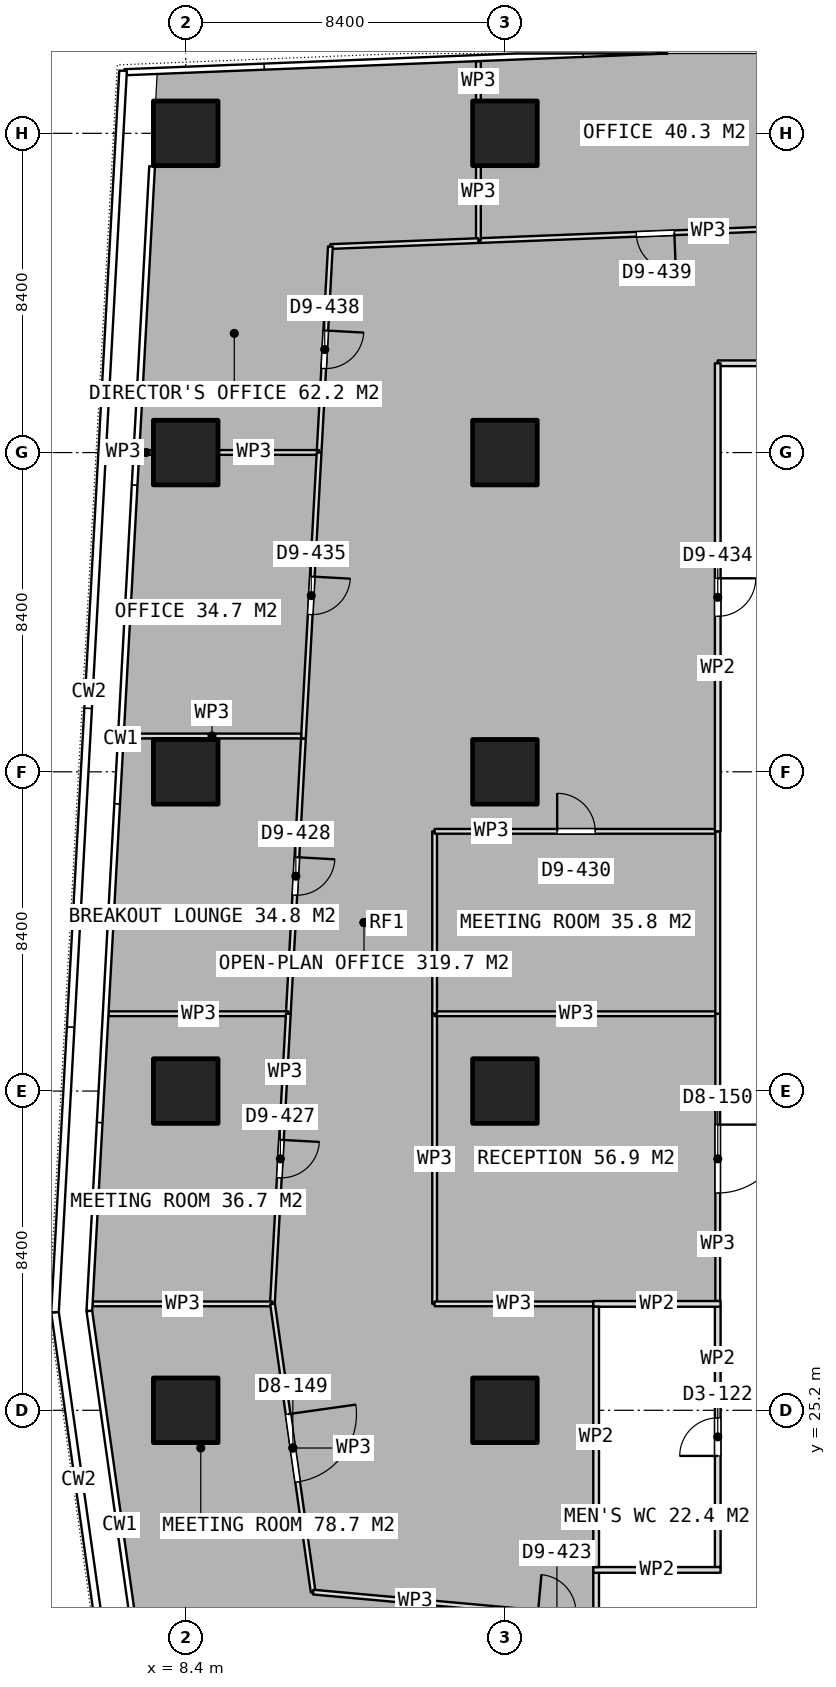
"""IFC4 building model, lengths in metres.
Left out: names, types, materials, properties, quantities, classifications, styles, units other than length and angle.
Written with IfcOpenShell. Run it as: python <this file> out.ifc"""

import sys

from ifc_helpers import new_model, si_unit, direction, frame, frame_2d, origin, origin_2d, place, context, subcontext, project, spatial, rectangle, extrude, element, fill, save


model = new_model("IFC4")
c1 = context("Model", 3, precision=1e-05, world=origin(), true_north=direction((0.0, 1.0)))
c2 = subcontext(c1, "Body", "Model", "MODEL_VIEW")
j1 = project(units=[si_unit("LENGTHUNIT", "METRE"), si_unit("PLANEANGLEUNIT", "RADIAN")], contexts=[c1])
p1 = place(None, origin())
s1 = spatial("IfcSite", under=j1, at=p1, CompositionType="ELEMENT")
p2 = place(p1, origin())
s2 = spatial("IfcBuilding", under=s1, at=p2, CompositionType="ELEMENT")
p3 = place(p2, frame((0.0, 0.0, 117.8)))
s3 = spatial("IfcBuildingStorey", under=s2, at=p3, CompositionType="ELEMENT", Elevation=117.8)
for number, where, z_axis, x_axis in (
    (1, (8.4, 25.2, 0.0), (0.0, 0.0, 1.0), (1.0, 0.0, 0.0)),
    (2, (8.4, 33.6, 0.0), (0.0, 0.0, 1.0), (1.0, 0.0, 0.0)),
    (3, (8.4, 42.0, 0.0), (0.0, 0.0, 1.0), (1.0, 0.0, 0.0)),
    (4, (8.4, 50.4, 0.0), (0.0, 0.0, 1.0), (1.0, 0.0, 0.0)),
    (5, (8.4, 58.8, 0.0), (0.0, 0.0, 1.0), (1.0, 0.0, 0.0)),
    (6, (16.8, 25.2, 0.0), (0.0, 0.0, 1.0), (1.0, 0.0, 0.0)),
    (7, (16.8, 33.6, 0.0), (0.0, 0.0, 1.0), (1.0, 0.0, 0.0)),
    (8, (16.8, 42.0, 0.0), (0.0, 0.0, 1.0), (1.0, 0.0, 0.0)),
    (9, (16.8, 50.4, 0.0), (0.0, 0.0, 1.0), (1.0, 0.0, 0.0)),
    (10, (16.8, 58.8, 0.0), (0.0, 0.0, 1.0), (1.0, 0.0, 0.0)),
):
    element("IfcColumn", number, at=place(p3, frame(where, z_axis=z_axis, x_axis=x_axis)), inside=s3, PredefinedType="COLUMN", context=c2, shape_type="SweptSolid", body=[
        extrude(rectangle(XDim=1.7, YDim=1.7, at=origin_2d()), origin(), (0.0, 0.0, 1.0), 3.75),
    ])
for number, where, z_axis, x_axis in (
    (11, (19.125, 21.0, 0.0), (0.0, 0.0, 1.0), (1.0, 0.0, 0.0)),
    (12, (19.125, 28.0, 0.0), (0.0, 0.0, 1.0), (1.0, 0.0, 0.0)),
):
    element("IfcWall", number, at=place(p3, frame(where, z_axis=z_axis, x_axis=x_axis)), inside=s3, PredefinedType="PARTITIONING", context=c2, shape_type="SweptSolid", body=[
        extrude(rectangle(XDim=3.35, YDim=0.15, at=frame_2d((1.675, 0.0))), origin(), (0.0, 0.0, 1.0), 3.5),
    ])
p4 = place(p3, frame((19.2, 21.075, 0.0), z_axis=(0.0, 0.0, 1.0), x_axis=(0.0, 1.0, 0.0)))
e13 = element("IfcWall", 13, at=p4, inside=s3, PredefinedType="PARTITIONING", context=c2, shape_type="SweptSolid", body=[
    extrude(rectangle(XDim=6.85, YDim=0.15, at=frame_2d((3.425, 0.0))), origin(), (0.0, 0.0, 1.0), 3.5),
])
p5 = place(p3, frame((22.4, 21.075, 0.0), z_axis=(0.0, 0.0, 1.0), x_axis=(0.0, 1.0, 0.0)))
e14 = element("IfcWall", 14, at=p5, inside=s3, PredefinedType="PARTITIONING", context=c2, shape_type="SweptSolid", body=[
    extrude(rectangle(XDim=6.85, YDim=0.15, at=frame_2d((3.425, 0.0))), origin(), (0.0, 0.0, 1.0), 3.5),
])
p6 = place(p5, frame((2.925, 0.0, 0.0)))
e15 = element("IfcOpeningElement", 15, at=p6, cuts=e14, PredefinedType="OPENING", context=c2, shape_type="SweptSolid", body=[
    extrude(rectangle(XDim=1.0, YDim=2.1, at=frame_2d((0.5, 1.05))), frame((0.0, 0.085, 0.0), z_axis=(0.0, -1.0, 0.0), x_axis=(1.0, 0.0, 0.0)), (0.0, 0.0, 1.0), 0.17),
])
p7 = place(p3, frame((25.413, 56.35, 0.0), z_axis=(0.0, 0.0, 1.0), x_axis=(-0.999198361773, -0.04003290935, 0.0)))
e16 = element("IfcWall", 16, at=p7, inside=s3, PredefinedType="PARTITIONING", context=c2, shape_type="SweptSolid", body=[
    extrude(rectangle(XDim=9.319, YDim=0.125, at=frame_2d((4.659, 0.0))), origin(), (0.0, 0.0, 1.0), 3.5),
])
p8 = place(p7, frame((4.159, 0.0, 0.0)))
e17 = element("IfcOpeningElement", 17, at=p8, cuts=e16, PredefinedType="OPENING", context=c2, shape_type="SweptSolid", body=[
    extrude(rectangle(XDim=1.0, YDim=2.1, at=frame_2d((0.5, 1.05))), frame((0.0, 0.073, 0.0), z_axis=(0.0, -1.0, 0.0), x_axis=(1.0, 0.0, 0.0)), (0.0, 0.0, 1.0), 0.145),
])
p9 = place(p3, frame((16.102, 55.977, 0.0), z_axis=(0.0, 0.0, 1.0), x_axis=(0.0, 1.0, 0.0)))
e18 = element("IfcWall", 18, at=p9, inside=s3, PredefinedType="PARTITIONING", context=c2, shape_type="SweptSolid", body=[
    extrude(rectangle(XDim=1.953, YDim=0.125, at=frame_2d((0.977, 0.0))), origin(), (0.0, 0.0, 1.0), 3.5),
])
p10 = place(p3, frame((16.102, 59.67, 0.0), z_axis=(0.0, 0.0, 1.0), x_axis=(0.0, 1.0, 0.0)))
e19 = element("IfcWall", 19, at=p10, inside=s3, PredefinedType="PARTITIONING", context=c2, shape_type="SweptSolid", body=[
    extrude(rectangle(XDim=1.03, YDim=0.125, at=frame_2d((0.515, 0.0))), origin(), (0.0, 0.0, 1.0), 3.5),
])
p11 = place(p3, frame((16.101, 55.977, 0.0), z_axis=(0.0, 0.0, 1.0), x_axis=(-0.99919845494, -0.040030583869, 0.0)))
e20 = element("IfcWall", 20, at=p11, inside=s3, PredefinedType="PARTITIONING", context=c2, shape_type="SweptSolid", body=[
    extrude(rectangle(XDim=3.897, YDim=0.125, at=frame_2d((1.949, 0.0))), origin(), (0.0, 0.0, 1.0), 3.5),
])
p12 = place(p3, frame((12.207, 55.821, 0.0), z_axis=(0.0, 0.0, 1.0), x_axis=(-0.054757305638, -0.998499693279, 0.0)))
e21 = element("IfcWall", 21, at=p12, inside=s3, PredefinedType="PARTITIONING", context=c2, shape_type="SweptSolid", body=[
    extrude(rectangle(XDim=5.426, YDim=0.125, at=frame_2d((2.713, 0.0))), origin(), (0.0, 0.0, 1.0), 3.5),
])
p13 = place(p12, frame((2.213, 0.0, 0.0)))
e22 = element("IfcOpeningElement", 22, at=p13, cuts=e21, PredefinedType="OPENING", context=c2, shape_type="SweptSolid", body=[
    extrude(rectangle(XDim=1.0, YDim=2.1, at=frame_2d((0.5, 1.05))), frame((0.0, 0.073, 0.0), z_axis=(0.0, -1.0, 0.0), x_axis=(1.0, 0.0, 0.0)), (0.0, 0.0, 1.0), 0.145),
])
p14 = place(p3, frame((11.91, 50.403, 0.0), z_axis=(0.0, 0.0, 1.0), x_axis=(-1.0, 0.0, 0.0)))
e23 = element("IfcWall", 23, at=p14, inside=s3, PredefinedType="PARTITIONING", context=c2, shape_type="SweptSolid", body=[
    extrude(rectangle(XDim=2.64, YDim=0.125, at=frame_2d((1.32, 0.0))), origin(), (0.0, 0.0, 1.0), 3.5),
])
p15 = place(p3, frame((7.53, 50.403, 0.0), z_axis=(0.0, 0.0, 1.0), x_axis=(-1.0, 0.0, 0.0)))
e24 = element("IfcWall", 24, at=p15, inside=s3, PredefinedType="PARTITIONING", context=c2, shape_type="SweptSolid", body=[
    extrude(rectangle(XDim=0.347, YDim=0.125, at=frame_2d((0.173, 0.0))), origin(), (0.0, 0.0, 1.0), 3.5),
])
p16 = place(p3, frame((11.91, 50.402, 0.0), z_axis=(0.0, 0.0, 1.0), x_axis=(-0.054750918435, -0.998500043531, 0.0)))
e25 = element("IfcWall", 25, at=p16, inside=s3, PredefinedType="PARTITIONING", context=c2, shape_type="SweptSolid", body=[
    extrude(rectangle(XDim=7.54, YDim=0.125, at=frame_2d((3.77, 0.0))), origin(), (0.0, 0.0, 1.0), 3.5),
])
p17 = place(p16, frame((3.27, 0.0, 0.0)))
e26 = element("IfcOpeningElement", 26, at=p17, cuts=e25, PredefinedType="OPENING", context=c2, shape_type="SweptSolid", body=[
    extrude(rectangle(XDim=1.0, YDim=2.1, at=frame_2d((0.5, 1.05))), frame((0.0, 0.073, 0.0), z_axis=(0.0, -1.0, 0.0), x_axis=(1.0, 0.0, 0.0)), (0.0, 0.0, 1.0), 0.145),
])
p18 = place(p3, frame((11.438, 42.943, 0.0), z_axis=(0.0, 0.0, 1.0), x_axis=(-1.0, 0.0, 0.0)))
e27 = element("IfcWall", 27, at=p18, inside=s3, PredefinedType="PARTITIONING", context=c2, shape_type="SweptSolid", body=[
    extrude(rectangle(XDim=4.694, YDim=0.125, at=frame_2d((2.347, 0.0))), origin(), (0.0, 0.0, 1.0), 3.5),
])
p19 = place(p3, frame((11.497, 42.872, 0.0), z_axis=(0.0, 0.0, 1.0), x_axis=(-0.054770412321, -0.998498974428, 0.0)))
e28 = element("IfcWall", 28, at=p19, inside=s3, PredefinedType="PARTITIONING", context=c2, shape_type="SweptSolid", body=[
    extrude(rectangle(XDim=7.248, YDim=0.125, at=frame_2d((3.624, 0.0))), origin(), (0.0, 0.0, 1.0), 3.5),
])
p20 = place(p19, frame((3.124, 0.0, 0.0)))
e29 = element("IfcOpeningElement", 29, at=p20, cuts=e28, PredefinedType="OPENING", context=c2, shape_type="SweptSolid", body=[
    extrude(rectangle(XDim=1.0, YDim=2.1, at=frame_2d((0.5, 1.05))), frame((0.0, 0.073, 0.0), z_axis=(0.0, -1.0, 0.0), x_axis=(1.0, 0.0, 0.0)), (0.0, 0.0, 1.0), 0.145),
])
p21 = place(p3, frame((11.1, 35.635, 0.0), z_axis=(0.0, 0.0, 1.0), x_axis=(-1.0, 0.0, 0.0)))
e30 = element("IfcWall", 30, at=p21, inside=s3, PredefinedType="PARTITIONING", context=c2, shape_type="SweptSolid", body=[
    extrude(rectangle(XDim=4.727, YDim=0.125, at=frame_2d((2.364, 0.0))), origin(), (0.0, 0.0, 1.0), 3.5),
])
p22 = place(p3, frame((11.1, 35.634, 0.0), z_axis=(0.0, 0.0, 1.0), x_axis=(-0.054828018509, -0.998495812904, 0.0)))
e31 = element("IfcWall", 31, at=p22, inside=s3, PredefinedType="PARTITIONING", context=c2, shape_type="SweptSolid", body=[
    extrude(rectangle(XDim=7.646, YDim=0.125, at=frame_2d((3.823, 0.0))), origin(), (0.0, 0.0, 1.0), 3.5),
])
p23 = place(p22, frame((3.323, 0.0, 0.0)))
e32 = element("IfcOpeningElement", 32, at=p23, cuts=e31, PredefinedType="OPENING", context=c2, shape_type="SweptSolid", body=[
    extrude(rectangle(XDim=1.0, YDim=2.1, at=frame_2d((0.5, 1.05))), frame((0.0, 0.073, 0.0), z_axis=(0.0, -1.0, 0.0), x_axis=(1.0, 0.0, 0.0)), (0.0, 0.0, 1.0), 0.145),
])
p24 = place(p3, frame((10.681, 28.0, 0.0), z_axis=(0.0, 0.0, 1.0), x_axis=(-1.0, 0.0, 0.0)))
e33 = element("IfcWall", 33, at=p24, inside=s3, PredefinedType="PARTITIONING", context=c2, shape_type="SweptSolid", body=[
    extrude(rectangle(XDim=4.727, YDim=0.125, at=frame_2d((2.363, 0.0))), origin(), (0.0, 0.0, 1.0), 3.5),
])
p25 = place(p3, frame((10.685, 27.999, 0.0), z_axis=(0.0, 0.0, 1.0), x_axis=(0.139573309733, -0.990211740594, 0.0)))
e34 = element("IfcWall", 34, at=p25, inside=s3, PredefinedType="PARTITIONING", context=c2, shape_type="SweptSolid", body=[
    extrude(rectangle(XDim=7.658, YDim=0.125, at=frame_2d((3.829, 0.0))), origin(), (0.0, 0.0, 1.0), 3.5),
])
p26 = place(p25, frame((2.929, 0.0, 0.0)))
e35 = element("IfcOpeningElement", 35, at=p26, cuts=e34, PredefinedType="OPENING", context=c2, shape_type="SweptSolid", body=[
    extrude(rectangle(XDim=1.8, YDim=2.1, at=frame_2d((0.9, 1.05))), frame((0.0, 0.073, 0.0), z_axis=(0.0, -1.0, 0.0), x_axis=(1.0, 0.0, 0.0)), (0.0, 0.0, 1.0), 0.145),
])
p27 = place(p3, frame((11.754, 20.416, 0.0), z_axis=(0.0, 0.0, 1.0), x_axis=(0.995910967986, -0.090340156328, 0.0)))
e36 = element("IfcWall", 36, at=p27, inside=s3, PredefinedType="PARTITIONING", context=c2, shape_type="SweptSolid", body=[
    extrude(rectangle(XDim=5.402, YDim=0.125, at=frame_2d((2.701, 0.0))), origin(), (0.0, 0.0, 1.0), 3.5),
])
p28 = place(p3, frame((14.95, 28.0, 0.0), z_axis=(0.0, 0.0, 1.0), x_axis=(0.0, 1.0, 0.0)))
e37 = element("IfcWall", 37, at=p28, inside=s3, PredefinedType="PARTITIONING", context=c2, shape_type="SweptSolid", body=[
    extrude(rectangle(XDim=7.634, YDim=0.125, at=frame_2d((3.817, 0.0))), origin(), (0.0, 0.0, 1.0), 3.5),
])
p29 = place(p3, frame((14.95, 35.634, 0.0), z_axis=(0.0, 0.0, 1.0), x_axis=(1.0, 0.0, 0.0)))
e38 = element("IfcWall", 38, at=p29, inside=s3, PredefinedType="PARTITIONING", context=c2, shape_type="SweptSolid", body=[
    extrude(rectangle(XDim=7.45, YDim=0.125, at=frame_2d((3.725, 0.0))), origin(), (0.0, 0.0, 1.0), 3.5),
])
p30 = place(p3, frame((22.4, 35.634, 0.0), z_axis=(0.0, 0.0, 1.0), x_axis=(0.0, -1.0, 0.0)))
e39 = element("IfcWall", 39, at=p30, inside=s3, PredefinedType="PARTITIONING", context=c2, shape_type="SweptSolid", body=[
    extrude(rectangle(XDim=7.559, YDim=0.125, at=frame_2d((3.78, 0.0))), origin(), (0.0, 0.0, 1.0), 3.5),
])
p31 = place(p30, frame((2.917, 0.0, 0.0)))
e40 = element("IfcOpeningElement", 40, at=p31, cuts=e39, PredefinedType="OPENING", context=c2, shape_type="SweptSolid", body=[
    extrude(rectangle(XDim=1.8, YDim=2.1, at=frame_2d((0.9, 1.05))), frame((0.0, 0.073, 0.0), z_axis=(0.0, -1.0, 0.0), x_axis=(1.0, 0.0, 0.0)), (0.0, 0.0, 1.0), 0.145),
])
p32 = place(p3, frame((19.125, 28.0, 0.0), z_axis=(0.0, 0.0, 1.0), x_axis=(-1.0, 0.0, 0.0)))
e41 = element("IfcWall", 41, at=p32, inside=s3, PredefinedType="PARTITIONING", context=c2, shape_type="SweptSolid", body=[
    extrude(rectangle(XDim=4.175, YDim=0.125, at=frame_2d((2.087, 0.0))), origin(), (0.0, 0.0, 1.0), 3.5),
])
p33 = place(p3, frame((14.95, 35.634, 0.0), z_axis=(0.0, 0.0, 1.0), x_axis=(0.0, 1.0, 0.0)))
e42 = element("IfcWall", 42, at=p33, inside=s3, PredefinedType="PARTITIONING", context=c2, shape_type="SweptSolid", body=[
    extrude(rectangle(XDim=4.8, YDim=0.125, at=frame_2d((2.4, 0.0))), origin(), (0.0, 0.0, 1.0), 3.5),
])
p34 = place(p3, frame((14.95, 40.434, 0.0), z_axis=(0.0, 0.0, 1.0), x_axis=(1.0, 0.0, 0.0)))
e43 = element("IfcWall", 43, at=p34, inside=s3, PredefinedType="PARTITIONING", context=c2, shape_type="SweptSolid", body=[
    extrude(rectangle(XDim=7.45, YDim=0.125, at=frame_2d((3.725, 0.0))), origin(), (0.0, 0.0, 1.0), 3.5),
])
p35 = place(p34, frame((3.225, 0.0, 0.0)))
e44 = element("IfcOpeningElement", 44, at=p35, cuts=e43, PredefinedType="OPENING", context=c2, shape_type="SweptSolid", body=[
    extrude(rectangle(XDim=1.0, YDim=2.1, at=frame_2d((0.5, 1.05))), frame((0.0, 0.073, 0.0), z_axis=(0.0, -1.0, 0.0), x_axis=(1.0, 0.0, 0.0)), (0.0, 0.0, 1.0), 0.145),
])
p36 = place(p3, frame((22.4, 40.434, 0.0), z_axis=(0.0, 0.0, 1.0), x_axis=(0.0, -1.0, 0.0)))
e45 = element("IfcWall", 45, at=p36, inside=s3, PredefinedType="PARTITIONING", context=c2, shape_type="SweptSolid", body=[
    extrude(rectangle(XDim=4.8, YDim=0.125, at=frame_2d((2.4, 0.0))), origin(), (0.0, 0.0, 1.0), 3.5),
])
p37 = place(p3, frame((33.826, 52.75, 0.0), z_axis=(0.0, 0.0, 1.0), x_axis=(-1.0, 0.0, 0.0)))
e46 = element("IfcWall", 46, at=p37, inside=s3, PredefinedType="PARTITIONING", context=c2, shape_type="SweptSolid", body=[
    extrude(rectangle(XDim=11.426, YDim=0.15, at=frame_2d((5.713, 0.0))), origin(), (0.0, 0.0, 1.0), 3.5),
])
p38 = place(p3, frame((22.4, 52.75, 0.0), z_axis=(0.0, 0.0, 1.0), x_axis=(0.0, -1.0, 0.0)))
e47 = element("IfcWall", 47, at=p38, inside=s3, PredefinedType="PARTITIONING", context=c2, shape_type="SweptSolid", body=[
    extrude(rectangle(XDim=12.316, YDim=0.15, at=frame_2d((6.158, 0.0))), origin(), (0.0, 0.0, 1.0), 3.5),
])
p39 = place(p38, frame((5.658, 0.0, 0.0)))
e48 = element("IfcOpeningElement", 48, at=p39, cuts=e47, PredefinedType="OPENING", context=c2, shape_type="SweptSolid", body=[
    extrude(rectangle(XDim=1.0, YDim=2.1, at=frame_2d((0.5, 1.05))), frame((0.0, 0.085, 0.0), z_axis=(0.0, -1.0, 0.0), x_axis=(1.0, 0.0, 0.0)), (0.0, 0.0, 1.0), 0.17),
])
p40 = place(p3, frame((19.2, 20.925, 0.0), z_axis=(0.0, 0.0, 1.0), x_axis=(0.0, -1.0, 0.0)))
e49 = element("IfcWall", 49, at=p40, inside=s3, PredefinedType="PARTITIONING", context=c2, shape_type="SweptSolid", body=[
    extrude(rectangle(XDim=1.185, YDim=0.15, at=frame_2d((0.593, 0.0))), origin(), (0.0, 0.0, 1.0), 3.5),
])
p41 = place(p6, origin())
e50 = element("IfcDoor", 50, at=p41, inside=s3, OperationType="SINGLE_SWING_LEFT", PredefinedType="DOOR", context=c2, shape_type="SweptSolid", body=[
    extrude(rectangle(XDim=1.0, YDim=2.1, at=frame_2d((0.5, 1.05))), frame((0.0, 0.025, 0.0), z_axis=(0.0, -1.0, 0.0), x_axis=(1.0, 0.0, 0.0)), (0.0, 0.0, 1.0), 0.05),
])
fill(e15, e50)
p42 = place(p8, origin())
e51 = element("IfcDoor", 51, at=p42, inside=s3, OperationType="SINGLE_SWING_LEFT", PredefinedType="DOOR", context=c2, shape_type="SweptSolid", body=[
    extrude(rectangle(XDim=1.0, YDim=2.1, at=frame_2d((0.5, 1.05))), frame((0.0, 0.025, 0.0), z_axis=(0.0, -1.0, 0.0), x_axis=(1.0, 0.0, 0.0)), (0.0, 0.0, 1.0), 0.05),
])
fill(e17, e51)
p43 = place(p13, origin())
e52 = element("IfcDoor", 52, at=p43, inside=s3, OperationType="SINGLE_SWING_LEFT", PredefinedType="DOOR", context=c2, shape_type="SweptSolid", body=[
    extrude(rectangle(XDim=1.0, YDim=2.1, at=frame_2d((0.5, 1.05))), frame((0.0, 0.025, 0.0), z_axis=(0.0, -1.0, 0.0), x_axis=(1.0, 0.0, 0.0)), (0.0, 0.0, 1.0), 0.05),
])
fill(e22, e52)
p44 = place(p17, origin())
e53 = element("IfcDoor", 53, at=p44, inside=s3, OperationType="SINGLE_SWING_LEFT", PredefinedType="DOOR", context=c2, shape_type="SweptSolid", body=[
    extrude(rectangle(XDim=1.0, YDim=2.1, at=frame_2d((0.5, 1.05))), frame((0.0, 0.025, 0.0), z_axis=(0.0, -1.0, 0.0), x_axis=(1.0, 0.0, 0.0)), (0.0, 0.0, 1.0), 0.05),
])
fill(e26, e53)
p45 = place(p20, origin())
e54 = element("IfcDoor", 54, at=p45, inside=s3, OperationType="SINGLE_SWING_LEFT", PredefinedType="DOOR", context=c2, shape_type="SweptSolid", body=[
    extrude(rectangle(XDim=1.0, YDim=2.1, at=frame_2d((0.5, 1.05))), frame((0.0, 0.025, 0.0), z_axis=(0.0, -1.0, 0.0), x_axis=(1.0, 0.0, 0.0)), (0.0, 0.0, 1.0), 0.05),
])
fill(e29, e54)
p46 = place(p23, origin())
e55 = element("IfcDoor", 55, at=p46, inside=s3, OperationType="SINGLE_SWING_LEFT", PredefinedType="DOOR", context=c2, shape_type="SweptSolid", body=[
    extrude(rectangle(XDim=1.0, YDim=2.1, at=frame_2d((0.5, 1.05))), frame((0.0, 0.025, 0.0), z_axis=(0.0, -1.0, 0.0), x_axis=(1.0, 0.0, 0.0)), (0.0, 0.0, 1.0), 0.05),
])
fill(e32, e55)
p47 = place(p26, origin())
e56 = element("IfcDoor", 56, at=p47, inside=s3, OperationType="DOUBLE_DOOR_SINGLE_SWING", PredefinedType="DOOR", context=c2, shape_type="SweptSolid", body=[
    extrude(rectangle(XDim=1.8, YDim=2.1, at=frame_2d((0.9, 1.05))), frame((0.0, 0.025, 0.0), z_axis=(0.0, -1.0, 0.0), x_axis=(1.0, 0.0, 0.0)), (0.0, 0.0, 1.0), 0.05),
])
fill(e35, e56)
p48 = place(p31, origin())
e57 = element("IfcDoor", 57, at=p48, inside=s3, OperationType="DOUBLE_DOOR_SINGLE_SWING", PredefinedType="DOOR", context=c2, shape_type="SweptSolid", body=[
    extrude(rectangle(XDim=1.8, YDim=2.1, at=frame_2d((0.9, 1.05))), frame((0.0, 0.025, 0.0), z_axis=(0.0, -1.0, 0.0), x_axis=(1.0, 0.0, 0.0)), (0.0, 0.0, 1.0), 0.05),
])
fill(e40, e57)
p49 = place(p35, origin())
e58 = element("IfcDoor", 58, at=p49, inside=s3, OperationType="SINGLE_SWING_LEFT", PredefinedType="DOOR", context=c2, shape_type="SweptSolid", body=[
    extrude(rectangle(XDim=1.0, YDim=2.1, at=frame_2d((0.5, 1.05))), frame((0.0, 0.025, 0.0), z_axis=(0.0, -1.0, 0.0), x_axis=(1.0, 0.0, 0.0)), (0.0, 0.0, 1.0), 0.05),
])
fill(e44, e58)
p50 = place(p39, origin())
e59 = element("IfcDoor", 59, at=p50, inside=s3, OperationType="SINGLE_SWING_LEFT", PredefinedType="DOOR", context=c2, shape_type="SweptSolid", body=[
    extrude(rectangle(XDim=1.0, YDim=2.1, at=frame_2d((0.5, 1.05))), frame((0.0, 0.025, 0.0), z_axis=(0.0, -1.0, 0.0), x_axis=(1.0, 0.0, 0.0)), (0.0, 0.0, 1.0), 0.05),
])
fill(e48, e59)
save(model, sys.argv[1])
